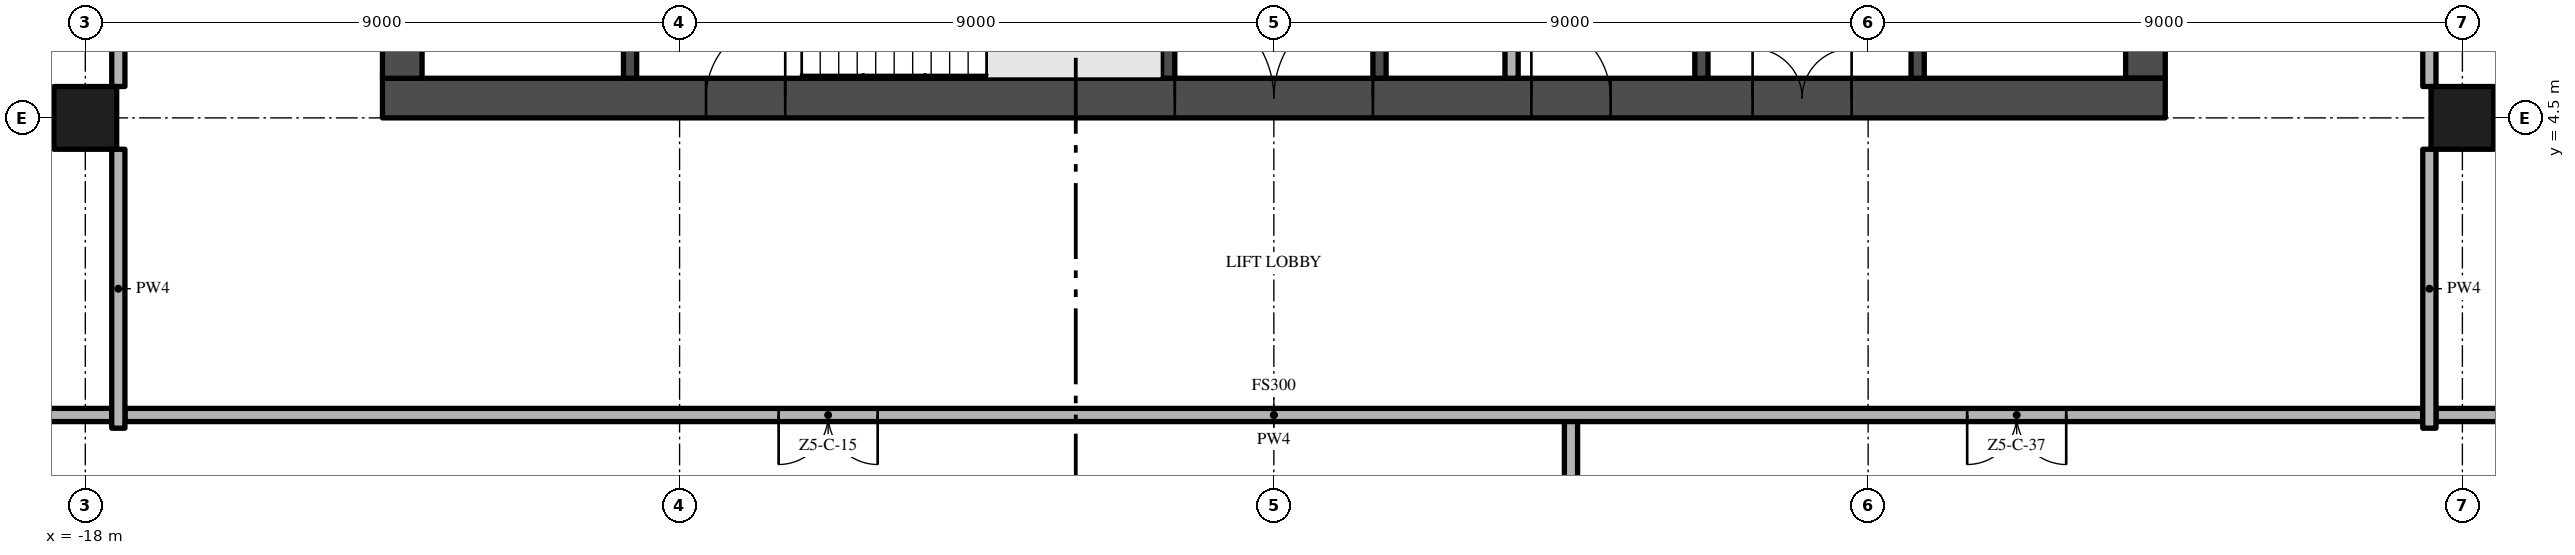
"""IFC4 building model, lengths in metres.
Left out: names, types, materials, properties, quantities, classifications, styles, units other than length and angle.
Written with IfcOpenShell. Run it as: python <this file> out.ifc"""

import sys

from ifc_helpers import new_model, si_unit, direction, frame, frame_2d, origin, origin_2d, place, context, subcontext, project, spatial, rectangle, extrude, element, fill, save


model = new_model("IFC4")
c1 = context("Model", 3, precision=1e-05, world=origin(), true_north=direction((0.0, 1.0)))
c2 = subcontext(c1, "Body", "Model", "MODEL_VIEW")
j1 = project(units=[si_unit("LENGTHUNIT", "METRE"), si_unit("PLANEANGLEUNIT", "RADIAN")], contexts=[c1])
p1 = place(None, origin())
s1 = spatial("IfcSite", under=j1, at=p1, CompositionType="ELEMENT")
p2 = place(p1, origin())
s2 = spatial("IfcBuilding", under=s1, at=p2, CompositionType="ELEMENT")
p3 = place(p2, frame((0.0, 0.0, 269.2)))
s3 = spatial("IfcBuildingStorey", under=s2, at=p3, CompositionType="ELEMENT", Elevation=269.2)
p4 = place(p3, frame((-13.5, 4.8, -0.3), z_axis=(0.0, 0.0, 1.0), x_axis=(1.0, 0.0, 0.0)))
e1 = element("IfcWall", 1, at=p4, inside=s3, PredefinedType="SHEAR", context=c2, shape_type="SweptSolid", body=[
    extrude(rectangle(XDim=27.0, YDim=0.6, at=frame_2d((13.5, 0.0))), origin(), (0.0, 0.0, 1.0), 3.8),
])
p5 = place(p4, frame((12.0, 0.0, 0.3)))
e2 = element("IfcOpeningElement", 2, at=p5, cuts=e1, PredefinedType="OPENING", context=c2, shape_type="SweptSolid", body=[
    extrude(rectangle(XDim=3.0, YDim=2.4, at=frame_2d((1.5, 1.2))), frame((0.0, 0.31, 0.0), z_axis=(0.0, -1.0, 0.0), x_axis=(1.0, 0.0, 0.0)), (0.0, 0.0, 1.0), 0.62),
])
p6 = place(p4, frame((4.9, 0.0, 0.3)))
e3 = element("IfcOpeningElement", 3, at=p6, cuts=e1, PredefinedType="OPENING", context=c2, shape_type="SweptSolid", body=[
    extrude(rectangle(XDim=1.2, YDim=2.2, at=frame_2d((0.6, 1.1))), frame((0.0, 0.31, 0.0), z_axis=(0.0, -1.0, 0.0), x_axis=(1.0, 0.0, 0.0)), (0.0, 0.0, 1.0), 0.62),
])
p7 = place(p4, frame((20.75, 0.0, 0.3)))
e4 = element("IfcOpeningElement", 4, at=p7, cuts=e1, PredefinedType="OPENING", context=c2, shape_type="SweptSolid", body=[
    extrude(rectangle(XDim=1.5, YDim=2.2, at=frame_2d((0.75, 1.1))), frame((0.0, 0.31, 0.0), z_axis=(0.0, -1.0, 0.0), x_axis=(1.0, 0.0, 0.0)), (0.0, 0.0, 1.0), 0.62),
])
p8 = place(p4, frame((17.4, 0.0, 0.3)))
e5 = element("IfcOpeningElement", 5, at=p8, cuts=e1, PredefinedType="OPENING", context=c2, shape_type="SweptSolid", body=[
    extrude(rectangle(XDim=1.2, YDim=2.2, at=frame_2d((0.6, 1.1))), frame((0.0, 0.31, 0.0), z_axis=(0.0, -1.0, 0.0), x_axis=(1.0, 0.0, 0.0)), (0.0, 0.0, 1.0), 0.62),
])
p9 = place(p3, frame((13.2, 5.1, -0.3), z_axis=(0.0, 0.0, 1.0), x_axis=(0.0, 1.0, 0.0)))
e6 = element("IfcWall", 6, at=p9, inside=s3, PredefinedType="SHEAR", context=c2, shape_type="SweptSolid", body=[
    extrude(rectangle(XDim=16.8, YDim=0.6, at=frame_2d((8.4, 0.0))), origin(), (0.0, 0.0, 1.0), 3.8),
])
p10 = place(p9, frame((6.3, 0.0, 0.3)))
e7 = element("IfcOpeningElement", 7, at=p10, cuts=e6, PredefinedType="OPENING", context=c2, shape_type="SweptSolid", body=[
    extrude(rectangle(XDim=1.2, YDim=2.2, at=frame_2d((0.6, 1.1))), frame((0.0, 0.31, 0.0), z_axis=(0.0, -1.0, 0.0), x_axis=(1.0, 0.0, 0.0)), (0.0, 0.0, 1.0), 0.62),
])
p11 = place(p3, frame((-13.2, 21.9, -0.3), z_axis=(0.0, 0.0, 1.0), x_axis=(0.0, -1.0, 0.0)))
e8 = element("IfcWall", 8, at=p11, inside=s3, PredefinedType="SHEAR", context=c2, shape_type="SweptSolid", body=[
    extrude(rectangle(XDim=16.8, YDim=0.6, at=frame_2d((8.4, 0.0))), origin(), (0.0, 0.0, 1.0), 3.8),
])
p12 = place(p11, frame((9.3, 0.0, 0.3)))
e9 = element("IfcOpeningElement", 9, at=p12, cuts=e8, PredefinedType="OPENING", context=c2, shape_type="SweptSolid", body=[
    extrude(rectangle(XDim=1.2, YDim=2.2, at=frame_2d((0.6, 1.1))), frame((0.0, 0.31, 0.0), z_axis=(0.0, -1.0, 0.0), x_axis=(1.0, 0.0, 0.0)), (0.0, 0.0, 1.0), 0.62),
])
for number, where, z_axis, x_axis in (
    (10, (-18.0, 4.5, 0.0), (0.0, 0.0, 1.0), (1.0, 0.0, 0.0)),
    (11, (18.0, 4.5, 0.0), (0.0, 0.0, 1.0), (1.0, 0.0, 0.0)),
):
    element("IfcColumn", number, at=place(p3, frame(where, z_axis=z_axis, x_axis=x_axis)), inside=s3, PredefinedType="COLUMN", context=c2, shape_type="SweptSolid", body=[
        extrude(rectangle(XDim=0.95, YDim=0.95, at=origin_2d()), origin(), (0.0, 0.0, 1.0), 3.5),
    ])
for number, where, z_axis, x_axis in (
    (12, (-9.75, 5.1, 0.0), (0.0, 0.0, 1.0), (0.0, 1.0, 0.0)),
    (13, (-1.6, 5.1, 0.0), (0.0, 0.0, 1.0), (0.0, 1.0, 0.0)),
):
    element("IfcWall", number, at=place(p3, frame(where, z_axis=z_axis, x_axis=x_axis)), inside=s3, PredefinedType="SHEAR", context=c2, shape_type="SweptSolid", body=[
        extrude(rectangle(XDim=2.85, YDim=0.2, at=frame_2d((1.425, 0.0))), origin(), (0.0, 0.0, 1.0), 3.5),
    ])
p13 = place(p3, frame((1.6, 13.5, 0.0), z_axis=(0.0, 0.0, 1.0), x_axis=(0.0, -1.0, 0.0)))
e14 = element("IfcWall", 14, at=p13, inside=s3, PredefinedType="SHEAR", context=c2, shape_type="SweptSolid", body=[
    extrude(rectangle(XDim=8.4, YDim=0.2, at=frame_2d((4.2, 0.0))), origin(), (0.0, 0.0, 1.0), 3.5),
])
p14 = place(p13, frame((3.35, 0.0, 0.0)))
e15 = element("IfcOpeningElement", 15, at=p14, cuts=e14, PredefinedType="OPENING", context=c2, shape_type="SweptSolid", body=[
    extrude(rectangle(XDim=0.9, YDim=2.1, at=frame_2d((0.45, 1.05))), frame((0.0, 0.11, 0.0), z_axis=(0.0, -1.0, 0.0), x_axis=(1.0, 0.0, 0.0)), (0.0, 0.0, 1.0), 0.22),
])
p15 = place(p3, frame((3.6, 13.5, 0.0), z_axis=(0.0, 0.0, 1.0), x_axis=(0.0, -1.0, 0.0)))
e16 = element("IfcWall", 16, at=p15, inside=s3, PredefinedType="PARTITIONING", context=c2, shape_type="SweptSolid", body=[
    extrude(rectangle(XDim=8.4, YDim=0.2, at=frame_2d((4.2, 0.0))), origin(), (0.0, 0.0, 1.0), 3.5),
])
p16 = place(p15, frame((3.75, 0.0, 0.0)))
e17 = element("IfcOpeningElement", 17, at=p16, cuts=e16, PredefinedType="OPENING", context=c2, shape_type="SweptSolid", body=[
    extrude(rectangle(XDim=0.9, YDim=2.1, at=frame_2d((0.45, 1.05))), frame((0.0, 0.11, 0.0), z_axis=(0.0, -1.0, 0.0), x_axis=(1.0, 0.0, 0.0)), (0.0, 0.0, 1.0), 0.22),
])
p17 = place(p3, frame((6.475, 5.1, 0.0), z_axis=(0.0, 0.0, 1.0), x_axis=(0.0, 1.0, 0.0)))
e18 = element("IfcWall", 18, at=p17, inside=s3, PredefinedType="SHEAR", context=c2, shape_type="SweptSolid", body=[
    extrude(rectangle(XDim=7.0, YDim=0.2, at=frame_2d((3.5, 0.0))), origin(), (0.0, 0.0, 1.0), 3.5),
])
p18 = place(p3, frame((9.75, 5.1, 0.0), z_axis=(0.0, 0.0, 1.0), x_axis=(0.0, 1.0, 0.0)))
e19 = element("IfcWall", 19, at=p18, inside=s3, PredefinedType="SHEAR", context=c2, shape_type="SweptSolid", body=[
    extrude(rectangle(XDim=2.5, YDim=0.2, at=frame_2d((1.25, 0.0))), origin(), (0.0, 0.0, 1.0), 3.5),
])
p19 = place(p18, frame((0.85, 0.0, 0.0)))
e20 = element("IfcOpeningElement", 20, at=p19, cuts=e19, PredefinedType="OPENING", context=c2, shape_type="SweptSolid", body=[
    extrude(rectangle(XDim=1.1, YDim=2.1, at=frame_2d((0.55, 1.05))), frame((0.0, 0.11, 0.0), z_axis=(0.0, -1.0, 0.0), x_axis=(1.0, 0.0, 0.0)), (0.0, 0.0, 1.0), 0.22),
])
p20 = place(p3, frame((17.4, 0.0, 0.0), z_axis=(0.0, 0.0, 1.0), x_axis=(-1.0, 0.0, 0.0)))
e21 = element("IfcWall", 21, at=p20, inside=s3, PredefinedType="PARTITIONING", context=c2, shape_type="SweptSolid", body=[
    extrude(rectangle(XDim=34.8, YDim=0.2, at=frame_2d((17.4, 0.0))), origin(), (0.0, 0.0, 1.0), 3.5),
])
p21 = place(p20, frame((23.4, 0.0, 0.0)))
e22 = element("IfcOpeningElement", 22, at=p21, cuts=e21, PredefinedType="OPENING", context=c2, shape_type="SweptSolid", body=[
    extrude(rectangle(XDim=1.5, YDim=2.4, at=frame_2d((0.75, 1.2))), frame((0.0, 0.11, 0.0), z_axis=(0.0, -1.0, 0.0), x_axis=(1.0, 0.0, 0.0)), (0.0, 0.0, 1.0), 0.22),
])
p22 = place(p20, frame((5.4, 0.0, 0.0)))
e23 = element("IfcOpeningElement", 23, at=p22, cuts=e21, PredefinedType="OPENING", context=c2, shape_type="SweptSolid", body=[
    extrude(rectangle(XDim=1.5, YDim=2.4, at=frame_2d((0.75, 1.2))), frame((0.0, 0.11, 0.0), z_axis=(0.0, -1.0, 0.0), x_axis=(1.0, 0.0, 0.0)), (0.0, 0.0, 1.0), 0.22),
])
for number, where, z_axis, x_axis in (
    (24, (-26.7, 0.0, 0.0), (0.0, 0.0, 1.0), (1.0, 0.0, 0.0)),
    (25, (17.6, 0.0, 0.0), (0.0, 0.0, 1.0), (1.0, 0.0, 0.0)),
):
    element("IfcWall", number, at=place(p3, frame(where, z_axis=z_axis, x_axis=x_axis)), inside=s3, PredefinedType="PARTITIONING", context=c2, shape_type="SweptSolid", body=[
        extrude(rectangle(XDim=9.1, YDim=0.2, at=frame_2d((4.55, 0.0))), origin(), (0.0, 0.0, 1.0), 3.5),
    ])
p23 = place(p3, frame((-17.5, -0.2, 0.0), z_axis=(0.0, 0.0, 1.0), x_axis=(0.0, 1.0, 0.0)))
e26 = element("IfcWall", 26, at=p23, inside=s3, PredefinedType="PARTITIONING", context=c2, shape_type="SweptSolid", body=[
    extrude(rectangle(XDim=4.225, YDim=0.2, at=frame_2d((2.112, 0.0))), origin(), (0.0, 0.0, 1.0), 3.5),
])
p24 = place(p3, frame((-17.5, 4.975, 0.0), z_axis=(0.0, 0.0, 1.0), x_axis=(0.0, 1.0, 0.0)))
e27 = element("IfcWall", 27, at=p24, inside=s3, PredefinedType="PARTITIONING", context=c2, shape_type="SweptSolid", body=[
    extrude(rectangle(XDim=8.05, YDim=0.2, at=frame_2d((4.025, 0.0))), origin(), (0.0, 0.0, 1.0), 3.5),
])
p25 = place(p3, frame((4.5, -22.2, 0.0), z_axis=(0.0, 0.0, 1.0), x_axis=(0.0, 1.0, 0.0)))
e28 = element("IfcWall", 28, at=p25, inside=s3, PredefinedType="PARTITIONING", context=c2, shape_type="SweptSolid", body=[
    extrude(rectangle(XDim=22.1, YDim=0.2, at=frame_2d((11.05, 0.0))), origin(), (0.0, 0.0, 1.0), 3.5),
])
p26 = place(p3, frame((17.5, -0.2, 0.0), z_axis=(0.0, 0.0, 1.0), x_axis=(0.0, 1.0, 0.0)))
e29 = element("IfcWall", 29, at=p26, inside=s3, PredefinedType="PARTITIONING", context=c2, shape_type="SweptSolid", body=[
    extrude(rectangle(XDim=4.225, YDim=0.2, at=frame_2d((2.112, 0.0))), origin(), (0.0, 0.0, 1.0), 3.5),
])
p27 = place(p3, frame((17.5, 13.025, 0.0), z_axis=(0.0, 0.0, 1.0), x_axis=(0.0, -1.0, 0.0)))
e30 = element("IfcWall", 30, at=p27, inside=s3, PredefinedType="PARTITIONING", context=c2, shape_type="SweptSolid", body=[
    extrude(rectangle(XDim=8.05, YDim=0.2, at=frame_2d((4.025, 0.0))), origin(), (0.0, 0.0, 1.0), 3.5),
])
p28 = place(p27, frame((5.65, 0.0, 0.0)))
e31 = element("IfcOpeningElement", 31, at=p28, cuts=e30, PredefinedType="OPENING", context=c2, shape_type="SweptSolid", body=[
    extrude(rectangle(XDim=1.2, YDim=2.4, at=frame_2d((0.6, 1.2))), frame((0.0, 0.11, 0.0), z_axis=(0.0, -1.0, 0.0), x_axis=(1.0, 0.0, 0.0)), (0.0, 0.0, 1.0), 0.22),
])
p29 = place(p5, frame((3.0, 0.0, 0.0), z_axis=(0.0, 0.0, 1.0), x_axis=(-1.0, 0.0, 0.0)))
e32 = element("IfcDoor", 32, at=p29, inside=s3, OperationType="DOUBLE_DOOR_SINGLE_SWING", PredefinedType="DOOR", context=c2, shape_type="SweptSolid", body=[
    extrude(rectangle(XDim=3.0, YDim=2.4, at=frame_2d((1.5, 1.2))), frame((0.0, 0.025, 0.0), z_axis=(0.0, -1.0, 0.0), x_axis=(1.0, 0.0, 0.0)), (0.0, 0.0, 1.0), 0.05),
])
fill(e2, e32)
p30 = place(p6, frame((1.2, 0.0, 0.0), z_axis=(0.0, 0.0, 1.0), x_axis=(-1.0, 0.0, 0.0)))
e33 = element("IfcDoor", 33, at=p30, inside=s3, OperationType="SINGLE_SWING_LEFT", PredefinedType="DOOR", context=c2, shape_type="SweptSolid", body=[
    extrude(rectangle(XDim=1.2, YDim=2.2, at=frame_2d((0.6, 1.1))), frame((0.0, 0.025, 0.0), z_axis=(0.0, -1.0, 0.0), x_axis=(1.0, 0.0, 0.0)), (0.0, 0.0, 1.0), 0.05),
])
fill(e3, e33)
p31 = place(p7, frame((1.5, 0.0, 0.0), z_axis=(0.0, 0.0, 1.0), x_axis=(-1.0, 0.0, 0.0)))
e34 = element("IfcDoor", 34, at=p31, inside=s3, OperationType="DOUBLE_DOOR_SINGLE_SWING", PredefinedType="DOOR", context=c2, shape_type="SweptSolid", body=[
    extrude(rectangle(XDim=1.5, YDim=2.2, at=frame_2d((0.75, 1.1))), frame((0.0, 0.025, 0.0), z_axis=(0.0, -1.0, 0.0), x_axis=(1.0, 0.0, 0.0)), (0.0, 0.0, 1.0), 0.05),
])
fill(e4, e34)
p32 = place(p8, frame((1.2, 0.0, 0.0), z_axis=(0.0, 0.0, 1.0), x_axis=(-1.0, 0.0, 0.0)))
e35 = element("IfcDoor", 35, at=p32, inside=s3, OperationType="SINGLE_SWING_RIGHT", PredefinedType="DOOR", context=c2, shape_type="SweptSolid", body=[
    extrude(rectangle(XDim=1.2, YDim=2.2, at=frame_2d((0.6, 1.1))), frame((0.0, 0.025, 0.0), z_axis=(0.0, -1.0, 0.0), x_axis=(1.0, 0.0, 0.0)), (0.0, 0.0, 1.0), 0.05),
])
fill(e5, e35)
p33 = place(p21, origin())
e36 = element("IfcDoor", 36, at=p33, inside=s3, OperationType="DOUBLE_DOOR_SINGLE_SWING", PredefinedType="DOOR", context=c2, shape_type="SweptSolid", body=[
    extrude(rectangle(XDim=1.5, YDim=2.4, at=frame_2d((0.75, 1.2))), frame((0.0, 0.025, 0.0), z_axis=(0.0, -1.0, 0.0), x_axis=(1.0, 0.0, 0.0)), (0.0, 0.0, 1.0), 0.05),
])
fill(e22, e36)
p34 = place(p22, origin())
e37 = element("IfcDoor", 37, at=p34, inside=s3, OperationType="DOUBLE_DOOR_SINGLE_SWING", PredefinedType="DOOR", context=c2, shape_type="SweptSolid", body=[
    extrude(rectangle(XDim=1.5, YDim=2.4, at=frame_2d((0.75, 1.2))), frame((0.0, 0.025, 0.0), z_axis=(0.0, -1.0, 0.0), x_axis=(1.0, 0.0, 0.0)), (0.0, 0.0, 1.0), 0.05),
])
fill(e23, e37)
save(model, sys.argv[1])
